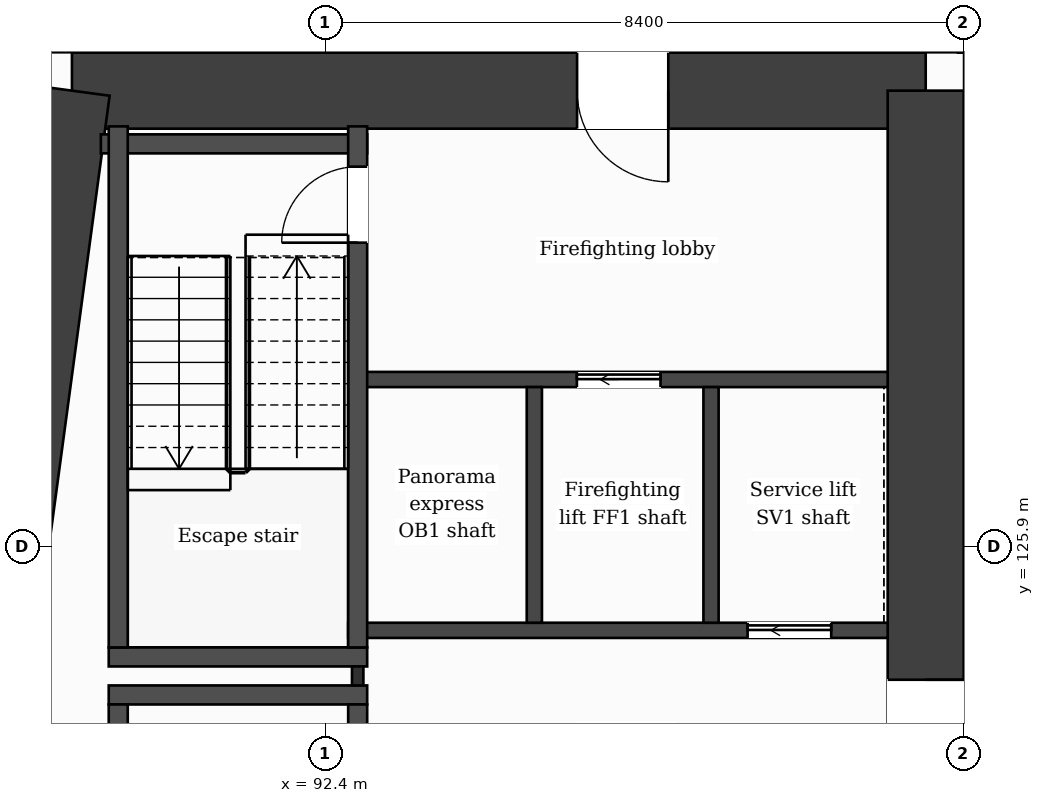
"""IFC4 building model, lengths in metres.
Left out: names, types, materials, properties, quantities, classifications, styles, units other than length and angle.
Written with IfcOpenShell. Run it as: python <this file> out.ifc"""

import sys

from ifc_helpers import new_model, si_unit, direction, frame, frame_2d, origin, place, context, subcontext, project, spatial, rectangle, extrude, element, fill, save


model = new_model("IFC4")
c1 = context("Model", 3, precision=1e-05, world=origin(), true_north=direction((0.0, 1.0)))
c2 = subcontext(c1, "Body", "Model", "MODEL_VIEW")
j1 = project(units=[si_unit("LENGTHUNIT", "METRE"), si_unit("PLANEANGLEUNIT", "RADIAN")], contexts=[c1])
p1 = place(None, origin())
s1 = spatial("IfcSite", under=j1, at=p1, CompositionType="ELEMENT")
p2 = place(p1, origin())
s2 = spatial("IfcBuilding", under=s1, at=p2, CompositionType="ELEMENT")
p3 = place(p2, frame((0.0, 0.0, 105.8)))
s3 = spatial("IfcBuildingStorey", under=s2, at=p3, CompositionType="ELEMENT", Elevation=105.8)
p4 = place(p3, frame((89.068, 131.9, 0.0), z_axis=(0.0, 0.0, 1.0), x_axis=(1.0, 0.0, 0.0)))
e1 = element("IfcWall", 1, at=p4, inside=s3, PredefinedType="SHEAR", context=c2, shape_type="SweptSolid", body=[
    extrude(rectangle(XDim=11.232, YDim=1.0, at=frame_2d((5.616, 0.0))), origin(), (0.0, 0.0, 1.0), 3.7),
])
p5 = place(p4, frame((6.646, 0.0, 0.0)))
e2 = element("IfcOpeningElement", 2, at=p5, cuts=e1, PredefinedType="OPENING", context=c2, shape_type="SweptSolid", body=[
    extrude(rectangle(XDim=1.2, YDim=2.1, at=frame_2d((0.6, 1.05))), frame((0.0, 0.51, 0.0), z_axis=(0.0, -1.0, 0.0), x_axis=(1.0, 0.0, 0.0)), (0.0, 0.0, 1.0), 1.02),
])
p6 = place(p3, frame((100.3, 131.9, 0.0), z_axis=(0.0, 0.0, 1.0), x_axis=(0.0, -1.0, 0.0)))
e3 = element("IfcWall", 3, at=p6, inside=s3, PredefinedType="SHEAR", context=c2, shape_type="SweptSolid", body=[
    extrude(rectangle(XDim=21.0, YDim=1.0, at=frame_2d((10.5, 0.0))), origin(), (0.0, 0.0, 1.0), 3.7),
])
p7 = place(p6, frame((7.75, 0.0, 0.0)))
e4 = element("IfcOpeningElement", 4, at=p7, cuts=e3, PredefinedType="OPENING", context=c2, shape_type="SweptSolid", body=[
    extrude(rectangle(XDim=1.4, YDim=2.1, at=frame_2d((0.7, 1.05))), frame((0.0, 0.51, 0.0), z_axis=(0.0, -1.0, 0.0), x_axis=(1.0, 0.0, 0.0)), (0.0, 0.0, 1.0), 1.02),
])
p8 = place(p3, frame((86.241, 110.9, 0.0), z_axis=(0.0, 0.0, 1.0), x_axis=(0.133411141623, 0.991060778808, 0.0)))
e5 = element("IfcWall", 5, at=p8, inside=s3, PredefinedType="SHEAR", context=c2, shape_type="SweptSolid", body=[
    extrude(rectangle(XDim=21.189, YDim=1.0, at=frame_2d((10.595, 0.0))), origin(), (0.0, 0.0, 1.0), 3.7),
])
p9 = place(p3, frame((91.177, 138.95, 0.0), z_axis=(0.0, 0.0, 1.0), x_axis=(-0.133426664613, -0.991058689065, 0.0)))
e6 = element("IfcWall", 6, at=p9, inside=s3, PredefinedType="SOLIDWALL", context=c2, shape_type="SweptSolid", body=[
    extrude(rectangle(XDim=6.609, YDim=0.3, at=frame_2d((3.305, 0.0))), origin(), (0.0, 0.0, 1.0), 3.38),
])
p10 = place(p9, frame((1.039, 0.0, 0.9)))
e7 = element("IfcOpeningElement", 7, at=p10, cuts=e6, PredefinedType="OPENING", context=c2, shape_type="SweptSolid", body=[
    extrude(rectangle(XDim=1.2, YDim=2.1, at=frame_2d((0.6, 1.05))), frame((0.0, 0.16, 0.0), z_axis=(0.0, -1.0, 0.0), x_axis=(1.0, 0.0, 0.0)), (0.0, 0.0, 1.0), 0.32),
])
p11 = place(p9, frame((4.294, 0.0, 0.0)))
e8 = element("IfcOpeningElement", 8, at=p11, cuts=e6, PredefinedType="OPENING", context=c2, shape_type="SweptSolid", body=[
    extrude(rectangle(XDim=1.2, YDim=2.4, at=frame_2d((0.6, 1.2))), frame((0.0, 0.16, 0.0), z_axis=(0.0, -1.0, 0.0), x_axis=(1.0, 0.0, 0.0)), (0.0, 0.0, 1.0), 0.32),
])
for number, where, z_axis, x_axis in (
    (9, (89.552, 123.95, 0.0), (0.0, 0.0, 1.0), (1.0, 0.0, 0.0)),
    (10, (89.552, 124.45, 0.0), (0.0, 0.0, 1.0), (1.0, 0.0, 0.0)),
):
    element("IfcWall", number, at=place(p3, frame(where, z_axis=z_axis, x_axis=x_axis)), inside=s3, PredefinedType="PARTITIONING", context=c2, shape_type="SweptSolid", body=[
        extrude(rectangle(XDim=3.4, YDim=0.25, at=frame_2d((1.7, 0.0))), origin(), (0.0, 0.0, 1.0), 3.38),
    ])
p12 = place(p3, frame((92.702, 124.8, 0.0), z_axis=(0.0, 0.0, 1.0), x_axis=(1.0, 0.0, 0.0)))
e11 = element("IfcWall", 11, at=p12, inside=s3, PredefinedType="PARTITIONING", context=c2, shape_type="SweptSolid", body=[
    extrude(rectangle(XDim=7.098, YDim=0.2, at=frame_2d((3.549, 0.0))), origin(), (0.0, 0.0, 1.0), 3.38),
])
p13 = place(p12, frame((5.255, 0.0, 0.0)))
e12 = element("IfcOpeningElement", 12, at=p13, cuts=e11, PredefinedType="OPENING", context=c2, shape_type="SweptSolid", body=[
    extrude(rectangle(XDim=1.1, YDim=2.1, at=frame_2d((0.55, 1.05))), frame((0.0, 0.11, 0.0), z_axis=(0.0, -1.0, 0.0), x_axis=(1.0, 0.0, 0.0)), (0.0, 0.0, 1.0), 0.22),
])
p14 = place(p3, frame((92.827, 128.1, 0.0), z_axis=(0.0, 0.0, 1.0), x_axis=(1.0, 0.0, 0.0)))
e13 = element("IfcWall", 13, at=p14, inside=s3, PredefinedType="PARTITIONING", context=c2, shape_type="SweptSolid", body=[
    extrude(rectangle(XDim=6.973, YDim=0.2, at=frame_2d((3.487, 0.0))), origin(), (0.0, 0.0, 1.0), 3.38),
])
p15 = place(p14, frame((2.884, 0.0, 0.0)))
e14 = element("IfcOpeningElement", 14, at=p15, cuts=e13, PredefinedType="OPENING", context=c2, shape_type="SweptSolid", body=[
    extrude(rectangle(XDim=1.1, YDim=2.1, at=frame_2d((0.55, 1.05))), frame((0.0, 0.11, 0.0), z_axis=(0.0, -1.0, 0.0), x_axis=(1.0, 0.0, 0.0)), (0.0, 0.0, 1.0), 0.22),
])
p16 = place(p3, frame((89.448, 131.2, 0.0), z_axis=(0.0, 0.0, 1.0), x_axis=(1.0, 0.0, 0.0)))
e15 = element("IfcWall", 15, at=p16, inside=s3, PredefinedType="PARTITIONING", context=c2, shape_type="SweptSolid", body=[
    extrude(rectangle(XDim=3.504, YDim=0.25, at=frame_2d((1.752, 0.0))), origin(), (0.0, 0.0, 1.0), 3.38),
])
for number, where, z_axis, x_axis in (
    (16, (89.677, 116.97, 0.0), (0.0, 0.0, 1.0), (0.0, 1.0, 0.0)),
    (17, (89.677, 124.575, 0.0), (0.0, 0.0, 1.0), (0.0, 1.0, 0.0)),
):
    element("IfcWall", number, at=place(p3, frame(where, z_axis=z_axis, x_axis=x_axis)), inside=s3, PredefinedType="PARTITIONING", context=c2, shape_type="SweptSolid", body=[
        extrude(rectangle(XDim=6.855, YDim=0.25, at=frame_2d((3.427, 0.0))), origin(), (0.0, 0.0, 1.0), 3.38),
    ])
p17 = place(p3, frame((92.827, 124.075, 0.0), z_axis=(0.0, 0.0, 1.0), x_axis=(0.0, 1.0, 0.0)))
e18 = element("IfcWall", 18, at=p17, inside=s3, PredefinedType="PARTITIONING", context=c2, shape_type="SweptSolid", body=[
    extrude(rectangle(XDim=0.25, YDim=0.15, at=frame_2d((0.125, 0.0))), origin(), (0.0, 0.0, 1.0), 3.38),
])
p18 = place(p3, frame((92.827, 116.97, 0.0), z_axis=(0.0, 0.0, 1.0), x_axis=(0.0, 1.0, 0.0)))
e19 = element("IfcWall", 19, at=p18, inside=s3, PredefinedType="PARTITIONING", context=c2, shape_type="SweptSolid", body=[
    extrude(rectangle(XDim=6.855, YDim=0.25, at=frame_2d((3.427, 0.0))), origin(), (0.0, 0.0, 1.0), 3.38),
])
p19 = place(p18, frame((5.555, 0.0, 0.0)))
e20 = element("IfcOpeningElement", 20, at=p19, cuts=e19, PredefinedType="OPENING", context=c2, shape_type="SweptSolid", body=[
    extrude(rectangle(XDim=0.95, YDim=2.1, at=frame_2d((0.475, 1.05))), frame((0.0, 0.135, 0.0), z_axis=(0.0, -1.0, 0.0), x_axis=(1.0, 0.0, 0.0)), (0.0, 0.0, 1.0), 0.27),
])
p20 = place(p3, frame((92.827, 124.575, 0.0), z_axis=(0.0, 0.0, 1.0), x_axis=(0.0, 1.0, 0.0)))
e21 = element("IfcWall", 21, at=p20, inside=s3, PredefinedType="PARTITIONING", context=c2, shape_type="SweptSolid", body=[
    extrude(rectangle(XDim=6.855, YDim=0.25, at=frame_2d((3.427, 0.0))), origin(), (0.0, 0.0, 1.0), 3.38),
])
p21 = place(p20, frame((5.325, 0.0, 0.0)))
e22 = element("IfcOpeningElement", 22, at=p21, cuts=e21, PredefinedType="OPENING", context=c2, shape_type="SweptSolid", body=[
    extrude(rectangle(XDim=1.0, YDim=2.1, at=frame_2d((0.5, 1.05))), frame((0.0, 0.135, 0.0), z_axis=(0.0, -1.0, 0.0), x_axis=(1.0, 0.0, 0.0)), (0.0, 0.0, 1.0), 0.27),
])
for number, where, z_axis, x_axis in (
    (23, (95.151, 124.9, 0.0), (0.0, 0.0, 1.0), (0.0, 1.0, 0.0)),
    (24, (97.476, 124.9, 0.0), (0.0, 0.0, 1.0), (0.0, 1.0, 0.0)),
):
    element("IfcWall", number, at=place(p3, frame(where, z_axis=z_axis, x_axis=x_axis)), inside=s3, PredefinedType="PARTITIONING", context=c2, shape_type="SweptSolid", body=[
        extrude(rectangle(XDim=3.1, YDim=0.2, at=frame_2d((1.55, 0.0))), origin(), (0.0, 0.0, 1.0), 3.38),
    ])
p22 = place(p15, origin())
e25 = element("IfcDoor", 25, at=p22, inside=s3, OperationType="SLIDING_TO_LEFT", PredefinedType="DOOR", context=c2, shape_type="SweptSolid", body=[
    extrude(rectangle(XDim=1.1, YDim=2.1, at=frame_2d((0.55, 1.05))), frame((0.0, 0.025, 0.0), z_axis=(0.0, -1.0, 0.0), x_axis=(1.0, 0.0, 0.0)), (0.0, 0.0, 1.0), 0.05),
])
fill(e14, e25)
p23 = place(p13, origin())
e26 = element("IfcDoor", 26, at=p23, inside=s3, OperationType="SLIDING_TO_LEFT", PredefinedType="DOOR", context=c2, shape_type="SweptSolid", body=[
    extrude(rectangle(XDim=1.1, YDim=2.1, at=frame_2d((0.55, 1.05))), frame((0.0, 0.025, 0.0), z_axis=(0.0, -1.0, 0.0), x_axis=(1.0, 0.0, 0.0)), (0.0, 0.0, 1.0), 0.05),
])
fill(e12, e26)
p24 = place(p21, origin())
e27 = element("IfcDoor", 27, at=p24, inside=s3, OperationType="SINGLE_SWING_LEFT", PredefinedType="DOOR", context=c2, shape_type="SweptSolid", body=[
    extrude(rectangle(XDim=1.0, YDim=2.1, at=frame_2d((0.5, 1.05))), frame((0.0, 0.025, 0.0), z_axis=(0.0, -1.0, 0.0), x_axis=(1.0, 0.0, 0.0)), (0.0, 0.0, 1.0), 0.05),
])
fill(e22, e27)
p25 = place(p5, origin())
e28 = element("IfcDoor", 28, at=p25, inside=s3, OperationType="SINGLE_SWING_RIGHT", PredefinedType="DOOR", context=c2, shape_type="SweptSolid", body=[
    extrude(rectangle(XDim=1.2, YDim=2.1, at=frame_2d((0.6, 1.05))), frame((0.0, 0.025, 0.0), z_axis=(0.0, -1.0, 0.0), x_axis=(1.0, 0.0, 0.0)), (0.0, 0.0, 1.0), 0.05),
])
fill(e2, e28)
p26 = place(p7, origin())
e29 = element("IfcDoor", 29, at=p26, inside=s3, OperationType="SINGLE_SWING_LEFT", PredefinedType="DOOR", context=c2, shape_type="SweptSolid", body=[
    extrude(rectangle(XDim=1.4, YDim=2.1, at=frame_2d((0.7, 1.05))), frame((0.0, 0.025, 0.0), z_axis=(0.0, -1.0, 0.0), x_axis=(1.0, 0.0, 0.0)), (0.0, 0.0, 1.0), 0.05),
])
fill(e4, e29)
save(model, sys.argv[1])
